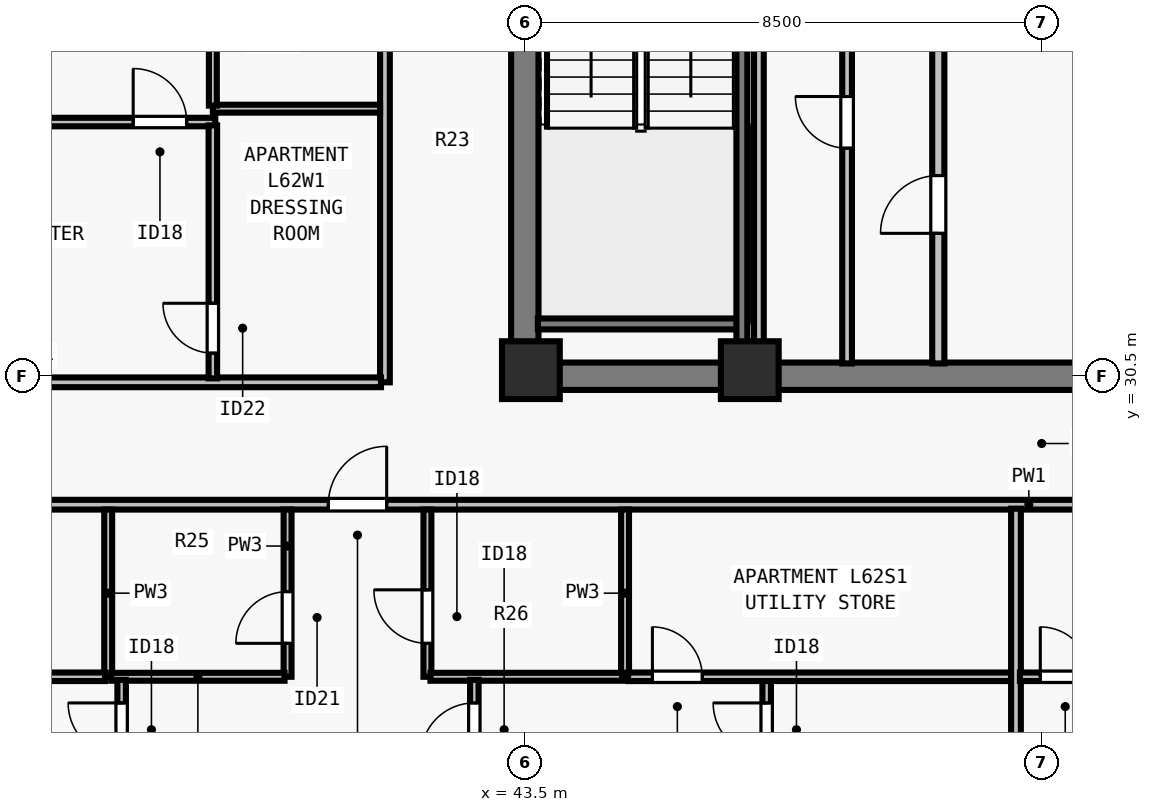
"""IFC4 building model, lengths in metres.
Left out: names, types, materials, properties, quantities, classifications, styles, units other than length and angle.
Written with IfcOpenShell. Run it as: python <this file> out.ifc"""

import sys

from ifc_helpers import new_model, si_unit, direction, frame, frame_2d, origin, origin_2d, place, context, subcontext, project, spatial, rectangle, extrude, element, fill, save


model = new_model("IFC4")
c1 = context("Model", 3, precision=1e-05, world=origin(), true_north=direction((0.0, 1.0)))
c2 = subcontext(c1, "Body", "Model", "MODEL_VIEW")
j1 = project(units=[si_unit("LENGTHUNIT", "METRE"), si_unit("PLANEANGLEUNIT", "RADIAN")], contexts=[c1])
p1 = place(None, origin())
s1 = spatial("IfcSite", under=j1, at=p1, CompositionType="ELEMENT")
p2 = place(p1, origin())
s2 = spatial("IfcBuilding", under=s1, at=p2, CompositionType="ELEMENT")
p3 = place(p2, frame((0.0, 0.0, 227.0)))
s3 = spatial("IfcBuildingStorey", under=s2, at=p3, CompositionType="ELEMENT", Elevation=227.0)
for number, where, z_axis, x_axis in (
    (1, (43.6, 30.6, 0.0), (0.0, 0.0, 1.0), (1.0, 0.0, 0.0)),
    (2, (47.2, 30.6, 0.0), (0.0, 0.0, 1.0), (1.0, 0.0, 0.0)),
):
    element("IfcColumn", number, at=place(p3, frame(where, z_axis=z_axis, x_axis=x_axis)), inside=s3, PredefinedType="COLUMN", context=c2, shape_type="SweptSolid", body=[
        extrude(rectangle(XDim=0.95, YDim=0.95, at=origin_2d()), origin(), (0.0, 0.0, 1.0), 3.5),
    ])
p4 = place(p3, frame((43.275, 30.5, 0.0), z_axis=(0.0, 0.0, 1.0), x_axis=(1.0, 0.0, 0.0)))
e3 = element("IfcWall", 3, at=p4, inside=s3, PredefinedType="SHEAR", context=c2, shape_type="SweptSolid", body=[
    extrude(rectangle(XDim=17.45, YDim=0.45, at=frame_2d((8.725, 0.0))), origin(), (0.0, 0.0, 1.0), 3.29),
])
p5 = place(p3, frame((43.5, 30.715, 0.0), z_axis=(0.0, 0.0, 1.0), x_axis=(0.0, 1.0, 0.0)))
e4 = element("IfcWall", 4, at=p5, inside=s3, PredefinedType="SHEAR", context=c2, shape_type="SweptSolid", body=[
    extrude(rectangle(XDim=8.035, YDim=0.45, at=frame_2d((4.018, 0.0))), origin(), (0.0, 0.0, 1.0), 3.29),
])
p6 = place(p3, frame((50.3, 30.71, 0.0), z_axis=(0.0, 0.0, 1.0), x_axis=(0.0, 1.0, 0.0)))
e5 = element("IfcWall", 5, at=p6, inside=s3, PredefinedType="SOLIDWALL", context=c2, shape_type="SweptSolid", body=[
    extrude(rectangle(XDim=7.905, YDim=0.2, at=frame_2d((3.953, 0.0))), origin(), (0.0, 0.0, 1.0), 3.29),
])
p7 = place(p6, frame((2.14, 0.0, 0.0)))
e6 = element("IfcOpeningElement", 6, at=p7, cuts=e5, PredefinedType="OPENING", context=c2, shape_type="SweptSolid", body=[
    extrude(rectangle(XDim=0.95, YDim=2.12, at=frame_2d((0.475, 1.06))), frame((0.0, 0.11, 0.0), z_axis=(0.0, -1.0, 0.0), x_axis=(1.0, 0.0, 0.0)), (0.0, 0.0, 1.0), 0.22),
])
p8 = place(p3, frame((47.35, 30.71, 0.0), z_axis=(0.0, 0.0, 1.0), x_axis=(0.0, 1.0, 0.0)))
e7 = element("IfcWall", 7, at=p8, inside=s3, PredefinedType="PARTITIONING", context=c2, shape_type="SweptSolid", body=[
    extrude(rectangle(XDim=7.905, YDim=0.16, at=frame_2d((3.953, 0.0))), origin(), (0.0, 0.0, 1.0), 3.29),
])
p9 = place(p3, frame((48.8, 30.71, 0.0), z_axis=(0.0, 0.0, 1.0), x_axis=(0.0, 1.0, 0.0)))
e8 = element("IfcWall", 8, at=p9, inside=s3, PredefinedType="PARTITIONING", context=c2, shape_type="SweptSolid", body=[
    extrude(rectangle(XDim=7.905, YDim=0.16, at=frame_2d((3.953, 0.0))), origin(), (0.0, 0.0, 1.0), 3.29),
])
p10 = place(p9, frame((3.54, 0.0, 0.0)))
e9 = element("IfcOpeningElement", 9, at=p10, cuts=e8, PredefinedType="OPENING", context=c2, shape_type="SweptSolid", body=[
    extrude(rectangle(XDim=0.85, YDim=2.12, at=frame_2d((0.425, 1.06))), frame((0.0, 0.09, 0.0), z_axis=(0.0, -1.0, 0.0), x_axis=(1.0, 0.0, 0.0)), (0.0, 0.0, 1.0), 0.18),
])
p11 = place(p3, frame((29.805, 28.387, 0.0), z_axis=(0.0, 0.0, 1.0), x_axis=(1.0, 0.0, 0.0)))
e10 = element("IfcWall", 10, at=p11, inside=s3, PredefinedType="PARTITIONING", context=c2, shape_type="SweptSolid", body=[
    extrude(rectangle(XDim=44.39, YDim=0.16, at=frame_2d((22.195, 0.0))), origin(), (0.0, 0.0, 1.0), 2.958),
])
p12 = place(p11, frame((10.464, 0.0, 0.0)))
e11 = element("IfcOpeningElement", 11, at=p12, cuts=e10, PredefinedType="OPENING", context=c2, shape_type="SweptSolid", body=[
    extrude(rectangle(XDim=0.96, YDim=2.18, at=frame_2d((0.48, 1.09))), frame((0.0, 0.09, 0.0), z_axis=(0.0, -1.0, 0.0), x_axis=(1.0, 0.0, 0.0)), (0.0, 0.0, 1.0), 0.18),
])
p13 = place(p11, frame((32.544, 0.0, 0.0)))
e12 = element("IfcOpeningElement", 12, at=p13, cuts=e10, PredefinedType="OPENING", context=c2, shape_type="SweptSolid", body=[
    extrude(rectangle(XDim=0.96, YDim=2.18, at=frame_2d((0.48, 1.09))), frame((0.0, 0.09, 0.0), z_axis=(0.0, -1.0, 0.0), x_axis=(1.0, 0.0, 0.0)), (0.0, 0.0, 1.0), 0.18),
])
p14 = place(p3, frame((41.2, 30.4, 0.0), z_axis=(0.0, 0.0, 1.0), x_axis=(0.0, 1.0, 0.0)))
e13 = element("IfcWall", 13, at=p14, inside=s3, PredefinedType="PARTITIONING", context=c2, shape_type="SweptSolid", body=[
    extrude(rectangle(XDim=17.2, YDim=0.16, at=frame_2d((8.6, 0.0))), origin(), (0.0, 0.0, 1.0), 3.29),
])
p15 = place(p14, frame((8.12, 0.0, 0.0)))
e14 = element("IfcOpeningElement", 14, at=p15, cuts=e13, PredefinedType="OPENING", context=c2, shape_type="SweptSolid", body=[
    extrude(rectangle(XDim=0.96, YDim=2.18, at=frame_2d((0.48, 1.09))), frame((0.0, 0.09, 0.0), z_axis=(0.0, -1.0, 0.0), x_axis=(1.0, 0.0, 0.0)), (0.0, 0.0, 1.0), 0.18),
])
p16 = place(p3, frame((29.805, 30.4, 0.0), z_axis=(0.0, 0.0, 1.0), x_axis=(1.0, 0.0, 0.0)))
e15 = element("IfcWall", 15, at=p16, inside=s3, PredefinedType="PARTITIONING", context=c2, shape_type="SweptSolid", body=[
    extrude(rectangle(XDim=11.33, YDim=0.16, at=frame_2d((5.665, 0.0))), origin(), (0.0, 0.0, 1.0), 3.29),
])
p17 = place(p3, frame((36.649, 25.558, 0.0), z_axis=(0.0, 0.0, 1.0), x_axis=(0.0, 1.0, 0.0)))
e16 = element("IfcWall", 16, at=p17, inside=s3, PredefinedType="PLUMBINGWALL", context=c2, shape_type="SweptSolid", body=[
    extrude(rectangle(XDim=2.75, YDim=0.13, at=frame_2d((1.375, 0.0))), origin(), (0.0, 0.0, 1.0), 3.29),
])
p18 = place(p3, frame((39.599, 25.558, 0.0), z_axis=(0.0, 0.0, 1.0), x_axis=(0.0, 1.0, 0.0)))
e17 = element("IfcWall", 17, at=p18, inside=s3, PredefinedType="PLUMBINGWALL", context=c2, shape_type="SweptSolid", body=[
    extrude(rectangle(XDim=2.75, YDim=0.13, at=frame_2d((1.375, 0.0))), origin(), (0.0, 0.0, 1.0), 3.29),
])
p19 = place(p18, frame((0.55, 0.0, 0.0)))
e18 = element("IfcOpeningElement", 18, at=p19, cuts=e17, PredefinedType="OPENING", context=c2, shape_type="SweptSolid", body=[
    extrude(rectangle(XDim=0.85, YDim=2.08, at=frame_2d((0.425, 1.04))), frame((0.0, 0.075, 0.0), z_axis=(0.0, -1.0, 0.0), x_axis=(1.0, 0.0, 0.0)), (0.0, 0.0, 1.0), 0.15),
])
p20 = place(p3, frame((36.699, 25.558, 0.0), z_axis=(0.0, 0.0, 1.0), x_axis=(1.0, 0.0, 0.0)))
e19 = element("IfcWall", 19, at=p20, inside=s3, PredefinedType="PLUMBINGWALL", context=c2, shape_type="SweptSolid", body=[
    extrude(rectangle(XDim=2.85, YDim=0.13, at=frame_2d((1.425, 0.0))), origin(), (0.0, 0.0, 1.0), 3.29),
])
p21 = place(p3, frame((45.149, 25.558, 0.0), z_axis=(0.0, 0.0, 1.0), x_axis=(0.0, 1.0, 0.0)))
e20 = element("IfcWall", 20, at=p21, inside=s3, PredefinedType="PLUMBINGWALL", context=c2, shape_type="SweptSolid", body=[
    extrude(rectangle(XDim=2.75, YDim=0.13, at=frame_2d((1.375, 0.0))), origin(), (0.0, 0.0, 1.0), 3.29),
])
p22 = place(p3, frame((41.899, 25.558, 0.0), z_axis=(0.0, 0.0, 1.0), x_axis=(0.0, 1.0, 0.0)))
e21 = element("IfcWall", 21, at=p22, inside=s3, PredefinedType="PLUMBINGWALL", context=c2, shape_type="SweptSolid", body=[
    extrude(rectangle(XDim=2.75, YDim=0.13, at=frame_2d((1.375, 0.0))), origin(), (0.0, 0.0, 1.0), 2.573),
])
p23 = place(p22, frame((0.55, 0.0, 0.0)))
e22 = element("IfcOpeningElement", 22, at=p23, cuts=e21, PredefinedType="OPENING", context=c2, shape_type="SweptSolid", body=[
    extrude(rectangle(XDim=0.88, YDim=2.1, at=frame_2d((0.44, 1.05))), frame((0.0, 0.075, 0.0), z_axis=(0.0, -1.0, 0.0), x_axis=(1.0, 0.0, 0.0)), (0.0, 0.0, 1.0), 0.15),
])
p24 = place(p3, frame((41.949, 25.558, 0.0), z_axis=(0.0, 0.0, 1.0), x_axis=(1.0, 0.0, 0.0)))
e23 = element("IfcWall", 23, at=p24, inside=s3, PredefinedType="PLUMBINGWALL", context=c2, shape_type="SweptSolid", body=[
    extrude(rectangle(XDim=3.15, YDim=0.13, at=frame_2d((1.575, 0.0))), origin(), (0.0, 0.0, 1.0), 3.29),
])
p25 = place(p3, frame((36.87, 16.88, 0.0), z_axis=(0.0, 0.0, 1.0), x_axis=(0.0, 1.0, 0.0)))
e24 = element("IfcWall", 24, at=p25, inside=s3, PredefinedType="PARTITIONING", context=c2, shape_type="SweptSolid", body=[
    extrude(rectangle(XDim=8.628, YDim=0.14, at=frame_2d((4.314, 0.0))), origin(), (0.0, 0.0, 1.0), 2.573),
])
p26 = place(p25, frame((7.367, 0.0, 0.0)))
e25 = element("IfcOpeningElement", 25, at=p26, cuts=e24, PredefinedType="OPENING", context=c2, shape_type="SweptSolid", body=[
    extrude(rectangle(XDim=0.88, YDim=2.1, at=frame_2d((0.44, 1.05))), frame((0.0, 0.08, 0.0), z_axis=(0.0, -1.0, 0.0), x_axis=(1.0, 0.0, 0.0)), (0.0, 0.0, 1.0), 0.16),
])
p27 = place(p3, frame((29.87, 25.558, 0.0), z_axis=(0.0, 0.0, 1.0), x_axis=(1.0, 0.0, 0.0)))
e26 = element("IfcWall", 26, at=p27, inside=s3, PredefinedType="PARTITIONING", context=c2, shape_type="SweptSolid", body=[
    extrude(rectangle(XDim=6.729, YDim=0.14, at=frame_2d((3.364, 0.0))), origin(), (0.0, 0.0, 1.0), 2.958),
])
p28 = place(p27, frame((0.45, 0.0, 0.0)))
e27 = element("IfcOpeningElement", 27, at=p28, cuts=e26, PredefinedType="OPENING", context=c2, shape_type="SweptSolid", body=[
    extrude(rectangle(XDim=0.82, YDim=2.1, at=frame_2d((0.41, 1.05))), frame((0.0, 0.08, 0.0), z_axis=(0.0, -1.0, 0.0), x_axis=(1.0, 0.0, 0.0)), (0.0, 0.0, 1.0), 0.16),
])
p29 = place(p3, frame((47.478, 16.88, 0.0), z_axis=(0.0, 0.0, 1.0), x_axis=(0.0, 1.0, 0.0)))
e28 = element("IfcWall", 28, at=p29, inside=s3, PredefinedType="PARTITIONING", context=c2, shape_type="SweptSolid", body=[
    extrude(rectangle(XDim=8.718, YDim=0.14, at=frame_2d((4.359, 0.0))), origin(), (0.0, 0.0, 1.0), 2.958),
])
p30 = place(p29, frame((7.367, 0.0, 0.0)))
e29 = element("IfcOpeningElement", 29, at=p30, cuts=e28, PredefinedType="OPENING", context=c2, shape_type="SweptSolid", body=[
    extrude(rectangle(XDim=0.88, YDim=2.1, at=frame_2d((0.44, 1.05))), frame((0.0, 0.08, 0.0), z_axis=(0.0, -1.0, 0.0), x_axis=(1.0, 0.0, 0.0)), (0.0, 0.0, 1.0), 0.16),
])
p31 = place(p3, frame((45.199, 25.558, 0.0), z_axis=(0.0, 0.0, 1.0), x_axis=(1.0, 0.0, 0.0)))
e30 = element("IfcWall", 30, at=p31, inside=s3, PredefinedType="PARTITIONING", context=c2, shape_type="SweptSolid", body=[
    extrude(rectangle(XDim=6.429, YDim=0.14, at=frame_2d((3.214, 0.0))), origin(), (0.0, 0.0, 1.0), 3.29),
])
p32 = place(p31, frame((0.4, 0.0, 0.0)))
e31 = element("IfcOpeningElement", 31, at=p32, cuts=e30, PredefinedType="OPENING", context=c2, shape_type="SweptSolid", body=[
    extrude(rectangle(XDim=0.82, YDim=2.1, at=frame_2d((0.41, 1.05))), frame((0.0, 0.08, 0.0), z_axis=(0.0, -1.0, 0.0), x_axis=(1.0, 0.0, 0.0)), (0.0, 0.0, 1.0), 0.16),
])
p33 = place(p3, frame((42.67, 16.88, 0.0), z_axis=(0.0, 0.0, 1.0), x_axis=(0.0, 1.0, 0.0)))
e32 = element("IfcWall", 32, at=p33, inside=s3, PredefinedType="PARTITIONING", context=c2, shape_type="SweptSolid", body=[
    extrude(rectangle(XDim=8.628, YDim=0.14, at=frame_2d((4.314, 0.0))), origin(), (0.0, 0.0, 1.0), 3.29),
])
p34 = place(p33, frame((7.367, 0.0, 0.0)))
e33 = element("IfcOpeningElement", 33, at=p34, cuts=e32, PredefinedType="OPENING", context=c2, shape_type="SweptSolid", body=[
    extrude(rectangle(XDim=0.88, YDim=2.1, at=frame_2d((0.44, 1.05))), frame((0.0, 0.08, 0.0), z_axis=(0.0, -1.0, 0.0), x_axis=(1.0, 0.0, 0.0)), (0.0, 0.0, 1.0), 0.16),
])
p35 = place(p3, frame((51.577, 16.805, 0.0), z_axis=(0.0, 0.0, 1.0), x_axis=(0.0, 1.0, 0.0)))
e34 = element("IfcWall", 34, at=p35, inside=s3, PredefinedType="PARTITIONING", context=c2, shape_type="SweptSolid", body=[
    extrude(rectangle(XDim=11.518, YDim=0.16, at=frame_2d((5.759, 0.0))), origin(), (0.0, 0.0, 1.0), 2.958),
])
p36 = place(p3, frame((51.643, 25.558, 0.0), z_axis=(0.0, 0.0, 1.0), x_axis=(1.0, 0.0, 0.0)))
e35 = element("IfcWall", 35, at=p36, inside=s3, PredefinedType="PARTITIONING", context=c2, shape_type="SweptSolid", body=[
    extrude(rectangle(XDim=7.036, YDim=0.14, at=frame_2d((3.518, 0.0))), origin(), (0.0, 0.0, 1.0), 3.29),
])
p37 = place(p36, frame((0.335, 0.0, 0.0)))
e36 = element("IfcOpeningElement", 36, at=p37, cuts=e35, PredefinedType="OPENING", context=c2, shape_type="SweptSolid", body=[
    extrude(rectangle(XDim=0.82, YDim=2.1, at=frame_2d((0.41, 1.05))), frame((0.0, 0.08, 0.0), z_axis=(0.0, -1.0, 0.0), x_axis=(1.0, 0.0, 0.0)), (0.0, 0.0, 1.0), 0.16),
])
p38 = place(p3, frame((38.37, 34.9, 0.0), z_axis=(0.0, 0.0, 1.0), x_axis=(1.0, 0.0, 0.0)))
e37 = element("IfcWall", 37, at=p38, inside=s3, PredefinedType="PLUMBINGWALL", context=c2, shape_type="SweptSolid", body=[
    extrude(rectangle(XDim=2.75, YDim=0.13, at=frame_2d((1.375, 0.0))), origin(), (0.0, 0.0, 1.0), 3.29),
])
p39 = place(p3, frame((38.37, 34.95, 0.0), z_axis=(0.0, 0.0, 1.0), x_axis=(0.0, 1.0, 0.0)))
e38 = element("IfcWall", 38, at=p39, inside=s3, PredefinedType="PLUMBINGWALL", context=c2, shape_type="SweptSolid", body=[
    extrude(rectangle(XDim=2.85, YDim=0.13, at=frame_2d((1.425, 0.0))), origin(), (0.0, 0.0, 1.0), 3.29),
])
p40 = place(p3, frame((29.88, 34.68, 0.0), z_axis=(0.0, 0.0, 1.0), x_axis=(1.0, 0.0, 0.0)))
e39 = element("IfcWall", 39, at=p40, inside=s3, PredefinedType="PARTITIONING", context=c2, shape_type="SweptSolid", body=[
    extrude(rectangle(XDim=8.53, YDim=0.14, at=frame_2d((4.265, 0.0))), origin(), (0.0, 0.0, 1.0), 2.958),
])
p41 = place(p40, frame((7.18, 0.0, 0.0)))
e40 = element("IfcOpeningElement", 40, at=p41, cuts=e39, PredefinedType="OPENING", context=c2, shape_type="SweptSolid", body=[
    extrude(rectangle(XDim=0.88, YDim=2.1, at=frame_2d((0.44, 1.05))), frame((0.0, 0.08, 0.0), z_axis=(0.0, -1.0, 0.0), x_axis=(1.0, 0.0, 0.0)), (0.0, 0.0, 1.0), 0.16),
])
p42 = place(p3, frame((38.37, 30.465, 0.0), z_axis=(0.0, 0.0, 1.0), x_axis=(0.0, 1.0, 0.0)))
e41 = element("IfcWall", 41, at=p42, inside=s3, PredefinedType="PARTITIONING", context=c2, shape_type="SweptSolid", body=[
    extrude(rectangle(XDim=4.16, YDim=0.14, at=frame_2d((2.08, 0.0))), origin(), (0.0, 0.0, 1.0), 3.29),
])
p43 = place(p42, frame((0.415, 0.0, 0.0)))
e42 = element("IfcOpeningElement", 42, at=p43, cuts=e41, PredefinedType="OPENING", context=c2, shape_type="SweptSolid", body=[
    extrude(rectangle(XDim=0.82, YDim=2.1, at=frame_2d((0.41, 1.05))), frame((0.0, 0.08, 0.0), z_axis=(0.0, -1.0, 0.0), x_axis=(1.0, 0.0, 0.0)), (0.0, 0.0, 1.0), 0.16),
])
p44 = place(p3, frame((43.715, 31.36, 0.0), z_axis=(0.0, 0.0, 1.0), x_axis=(1.0, 0.0, 0.0)))
e43 = element("IfcWall", 43, at=p44, inside=s3, PredefinedType="SOLIDWALL", context=c2, shape_type="SweptSolid", body=[
    extrude(rectangle(XDim=3.28, YDim=0.18, at=frame_2d((1.64, 0.0))), origin(), (0.0, 0.0, 1.0), 3.29),
])
p45 = place(p3, frame((47.07, 38.78, 0.0), z_axis=(0.0, 0.0, 1.0), x_axis=(0.0, -1.0, 0.0)))
e44 = element("IfcWall", 44, at=p45, inside=s3, PredefinedType="SOLIDWALL", context=c2, shape_type="SweptSolid", body=[
    extrude(rectangle(XDim=8.067, YDim=0.18, at=frame_2d((4.034, 0.0))), origin(), (0.0, 0.0, 1.0), 3.29),
])
p46 = place(p7, origin())
e45 = element("IfcDoor", 45, at=p46, inside=s3, OperationType="SINGLE_SWING_LEFT", PredefinedType="DOOR", context=c2, shape_type="SweptSolid", body=[
    extrude(rectangle(XDim=0.95, YDim=2.12, at=frame_2d((0.475, 1.06))), frame((0.0, 0.025, 0.0), z_axis=(0.0, -1.0, 0.0), x_axis=(1.0, 0.0, 0.0)), (0.0, 0.0, 1.0), 0.05),
])
fill(e6, e45)
p47 = place(p10, origin())
e46 = element("IfcDoor", 46, at=p47, inside=s3, OperationType="SINGLE_SWING_RIGHT", PredefinedType="DOOR", context=c2, shape_type="SweptSolid", body=[
    extrude(rectangle(XDim=0.85, YDim=2.12, at=frame_2d((0.425, 1.06))), frame((0.0, 0.025, 0.0), z_axis=(0.0, -1.0, 0.0), x_axis=(1.0, 0.0, 0.0)), (0.0, 0.0, 1.0), 0.05),
])
fill(e9, e46)
p48 = place(p19, origin())
e47 = element("IfcDoor", 47, at=p48, inside=s3, OperationType="SINGLE_SWING_LEFT", PredefinedType="DOOR", context=c2, shape_type="SweptSolid", body=[
    extrude(rectangle(XDim=0.85, YDim=2.08, at=frame_2d((0.425, 1.04))), frame((0.0, 0.025, 0.0), z_axis=(0.0, -1.0, 0.0), x_axis=(1.0, 0.0, 0.0)), (0.0, 0.0, 1.0), 0.05),
])
fill(e18, e47)
p49 = place(p23, origin())
e48 = element("IfcDoor", 48, at=p49, inside=s3, OperationType="SINGLE_SWING_RIGHT", PredefinedType="DOOR", context=c2, shape_type="SweptSolid", body=[
    extrude(rectangle(XDim=0.88, YDim=2.1, at=frame_2d((0.44, 1.05))), frame((0.0, 0.025, 0.0), z_axis=(0.0, -1.0, 0.0), x_axis=(1.0, 0.0, 0.0)), (0.0, 0.0, 1.0), 0.05),
])
fill(e22, e48)
p50 = place(p26, origin())
e49 = element("IfcDoor", 49, at=p50, inside=s3, OperationType="SINGLE_SWING_RIGHT", PredefinedType="DOOR", context=c2, shape_type="SweptSolid", body=[
    extrude(rectangle(XDim=0.88, YDim=2.1, at=frame_2d((0.44, 1.05))), frame((0.0, 0.025, 0.0), z_axis=(0.0, -1.0, 0.0), x_axis=(1.0, 0.0, 0.0)), (0.0, 0.0, 1.0), 0.05),
])
fill(e25, e49)
p51 = place(p32, origin())
e50 = element("IfcDoor", 50, at=p51, inside=s3, OperationType="SINGLE_SWING_LEFT", PredefinedType="DOOR", context=c2, shape_type="SweptSolid", body=[
    extrude(rectangle(XDim=0.82, YDim=2.1, at=frame_2d((0.41, 1.05))), frame((0.0, 0.025, 0.0), z_axis=(0.0, -1.0, 0.0), x_axis=(1.0, 0.0, 0.0)), (0.0, 0.0, 1.0), 0.05),
])
fill(e31, e50)
p52 = place(p30, origin())
e51 = element("IfcDoor", 51, at=p52, inside=s3, OperationType="SINGLE_SWING_RIGHT", PredefinedType="DOOR", context=c2, shape_type="SweptSolid", body=[
    extrude(rectangle(XDim=0.88, YDim=2.1, at=frame_2d((0.44, 1.05))), frame((0.0, 0.025, 0.0), z_axis=(0.0, -1.0, 0.0), x_axis=(1.0, 0.0, 0.0)), (0.0, 0.0, 1.0), 0.05),
])
fill(e29, e51)
p53 = place(p34, origin())
e52 = element("IfcDoor", 52, at=p53, inside=s3, OperationType="SINGLE_SWING_LEFT", PredefinedType="DOOR", context=c2, shape_type="SweptSolid", body=[
    extrude(rectangle(XDim=0.88, YDim=2.1, at=frame_2d((0.44, 1.05))), frame((0.0, 0.025, 0.0), z_axis=(0.0, -1.0, 0.0), x_axis=(1.0, 0.0, 0.0)), (0.0, 0.0, 1.0), 0.05),
])
fill(e33, e52)
p54 = place(p12, origin())
e53 = element("IfcDoor", 53, at=p54, inside=s3, OperationType="SINGLE_SWING_RIGHT", PredefinedType="DOOR", context=c2, shape_type="SweptSolid", body=[
    extrude(rectangle(XDim=0.96, YDim=2.18, at=frame_2d((0.48, 1.09))), frame((0.0, 0.025, 0.0), z_axis=(0.0, -1.0, 0.0), x_axis=(1.0, 0.0, 0.0)), (0.0, 0.0, 1.0), 0.05),
])
fill(e11, e53)
p55 = place(p37, origin())
e54 = element("IfcDoor", 54, at=p55, inside=s3, OperationType="SINGLE_SWING_LEFT", PredefinedType="DOOR", context=c2, shape_type="SweptSolid", body=[
    extrude(rectangle(XDim=0.82, YDim=2.1, at=frame_2d((0.41, 1.05))), frame((0.0, 0.025, 0.0), z_axis=(0.0, -1.0, 0.0), x_axis=(1.0, 0.0, 0.0)), (0.0, 0.0, 1.0), 0.05),
])
fill(e36, e54)
p56 = place(p43, origin())
e55 = element("IfcDoor", 55, at=p56, inside=s3, OperationType="SINGLE_SWING_RIGHT", PredefinedType="DOOR", context=c2, shape_type="SweptSolid", body=[
    extrude(rectangle(XDim=0.82, YDim=2.1, at=frame_2d((0.41, 1.05))), frame((0.0, 0.025, 0.0), z_axis=(0.0, -1.0, 0.0), x_axis=(1.0, 0.0, 0.0)), (0.0, 0.0, 1.0), 0.05),
])
fill(e42, e55)
p57 = place(p41, origin())
e56 = element("IfcDoor", 56, at=p57, inside=s3, OperationType="SINGLE_SWING_LEFT", PredefinedType="DOOR", context=c2, shape_type="SweptSolid", body=[
    extrude(rectangle(XDim=0.88, YDim=2.1, at=frame_2d((0.44, 1.05))), frame((0.0, 0.025, 0.0), z_axis=(0.0, -1.0, 0.0), x_axis=(1.0, 0.0, 0.0)), (0.0, 0.0, 1.0), 0.05),
])
fill(e40, e56)
save(model, sys.argv[1])
